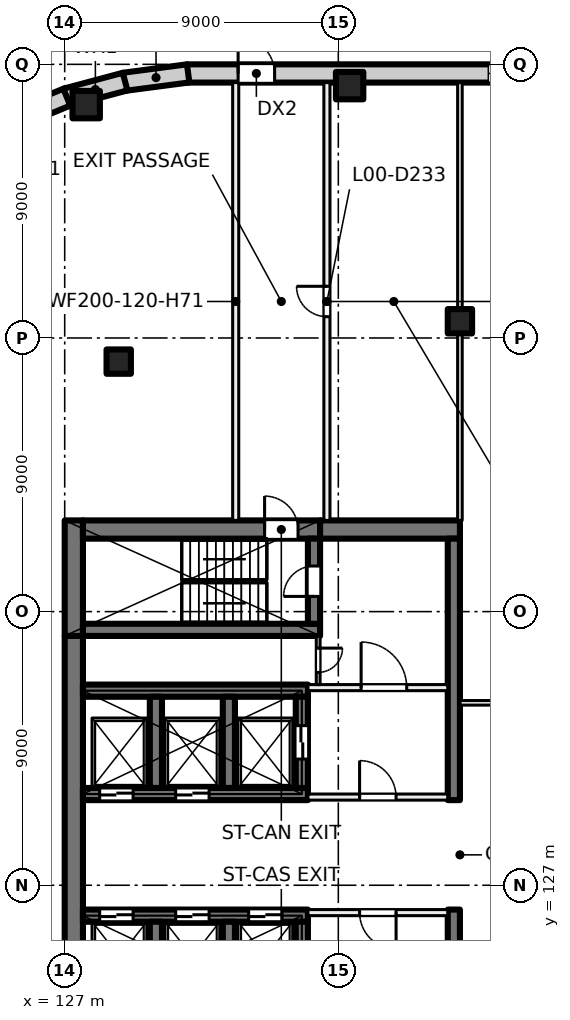
"""IFC4 building model, lengths in metres.
Left out: names, types, materials, properties, quantities, classifications, styles, units other than length and angle.
Written with IfcOpenShell. Run it as: python <this file> out.ifc"""

import sys

from ifc_helpers import new_model, si_unit, direction, frame, frame_2d, origin, origin_2d, place, context, subcontext, project, spatial, rectangle, extrude, element, fill, save


model = new_model("IFC4")
c1 = context("Model", 3, precision=1e-05, world=origin(), true_north=direction((0.0, 1.0)))
c2 = subcontext(c1, "Body", "Model", "MODEL_VIEW")
j1 = project(units=[si_unit("LENGTHUNIT", "METRE"), si_unit("PLANEANGLEUNIT", "RADIAN")], contexts=[c1])
p1 = place(None, origin())
s1 = spatial("IfcSite", under=j1, at=p1, CompositionType="ELEMENT")
p2 = place(p1, origin())
s2 = spatial("IfcBuilding", under=s1, at=p2, CompositionType="ELEMENT")
p3 = place(p2, origin())
s3 = spatial("IfcBuildingStorey", under=s2, at=p3, CompositionType="ELEMENT", Elevation=0.0)
for number, where, z_axis, x_axis in (
    (1, (127.707, 152.675, 0.0), (0.0, 0.0, 1.0), (1.0, 0.0, 0.0)),
    (2, (136.372, 153.3, 0.0), (0.0, 0.0, 1.0), (1.0, 0.0, 0.0)),
):
    element("IfcColumn", number, at=place(p3, frame(where, z_axis=z_axis, x_axis=x_axis)), inside=s3, PredefinedType="COLUMN", context=c2, shape_type="SweptSolid", body=[
        extrude(rectangle(XDim=0.9, YDim=0.9, at=origin_2d()), origin(), (0.0, 0.0, 1.0), 7.5),
    ])
for number, where, z_axis, x_axis in (
    (3, (128.777, 144.223, 0.0), (0.0, 0.0, 1.0), (1.0, 0.0, 0.0)),
    (4, (140.0, 145.55, 0.0), (0.0, 0.0, 1.0), (1.0, 0.0, 0.0)),
):
    element("IfcColumn", number, at=place(p3, frame(where, z_axis=z_axis, x_axis=x_axis)), inside=s3, PredefinedType="COLUMN", context=c2, shape_type="SweptSolid", body=[
        extrude(rectangle(XDim=0.8, YDim=0.8, at=origin_2d()), origin(), (0.0, 0.0, 1.0), 7.5),
    ])
p4 = place(p3, frame((127.3, 120.8, 0.0), z_axis=(0.0, 0.0, 1.0), x_axis=(0.0, 1.0, 0.0)))
e5 = element("IfcWall", 5, at=p4, inside=s3, PredefinedType="SHEAR", context=c2, shape_type="SweptSolid", body=[
    extrude(rectangle(XDim=14.4, YDim=0.6, at=frame_2d((7.2, 0.0))), origin(), (0.0, 0.0, 1.0), 7.5),
])
p5 = place(p3, frame((127.3, 135.2, 0.0), z_axis=(0.0, 0.0, 1.0), x_axis=(0.0, 1.0, 0.0)))
e6 = element("IfcWall", 6, at=p5, inside=s3, PredefinedType="SHEAR", context=c2, shape_type="SweptSolid", body=[
    extrude(rectangle(XDim=3.8, YDim=0.6, at=frame_2d((1.9, 0.0))), origin(), (0.0, 0.0, 1.0), 7.5),
])
p6 = place(p3, frame((127.6, 138.7, 0.0), z_axis=(0.0, 0.0, 1.0), x_axis=(1.0, 0.0, 0.0)))
e7 = element("IfcWall", 7, at=p6, inside=s3, PredefinedType="SHEAR", context=c2, shape_type="SweptSolid", body=[
    extrude(rectangle(XDim=7.8, YDim=0.6, at=frame_2d((3.9, 0.0))), origin(), (0.0, 0.0, 1.0), 7.5),
])
p7 = place(p6, frame((5.975, 0.0, 0.0)))
e8 = element("IfcOpeningElement", 8, at=p7, cuts=e7, PredefinedType="OPENING", context=c2, shape_type="SweptSolid", body=[
    extrude(rectangle(XDim=1.1, YDim=2.1, at=frame_2d((0.55, 1.05))), frame((0.0, 0.31, 0.0), z_axis=(0.0, -1.0, 0.0), x_axis=(1.0, 0.0, 0.0)), (0.0, 0.0, 1.0), 0.62),
])
p8 = place(p3, frame((135.4, 138.7, 0.0), z_axis=(0.0, 0.0, 1.0), x_axis=(1.0, 0.0, 0.0)))
e9 = element("IfcWall", 9, at=p8, inside=s3, PredefinedType="SHEAR", context=c2, shape_type="SweptSolid", body=[
    extrude(rectangle(XDim=4.6, YDim=0.6, at=frame_2d((2.3, 0.0))), origin(), (0.0, 0.0, 1.0), 7.5),
])
p9 = place(p3, frame((127.6, 135.4, 0.0), z_axis=(0.0, 0.0, 1.0), x_axis=(1.0, 0.0, 0.0)))
e10 = element("IfcWall", 10, at=p9, inside=s3, PredefinedType="SHEAR", context=c2, shape_type="SweptSolid", body=[
    extrude(rectangle(XDim=7.8, YDim=0.4, at=frame_2d((3.9, 0.0))), origin(), (0.0, 0.0, 1.0), 7.5),
])
p10 = place(p3, frame((135.2, 135.6, 0.0), z_axis=(0.0, 0.0, 1.0), x_axis=(0.0, 1.0, 0.0)))
e11 = element("IfcWall", 11, at=p10, inside=s3, PredefinedType="SHEAR", context=c2, shape_type="SweptSolid", body=[
    extrude(rectangle(XDim=2.8, YDim=0.4, at=frame_2d((1.4, 0.0))), origin(), (0.0, 0.0, 1.0), 7.5),
])
p11 = place(p10, frame((0.9, 0.0, 0.0)))
e12 = element("IfcOpeningElement", 12, at=p11, cuts=e11, PredefinedType="OPENING", context=c2, shape_type="SweptSolid", body=[
    extrude(rectangle(XDim=1.0, YDim=2.1, at=frame_2d((0.5, 1.05))), frame((0.0, 0.21, 0.0), z_axis=(0.0, -1.0, 0.0), x_axis=(1.0, 0.0, 0.0)), (0.0, 0.0, 1.0), 0.42),
])
p12 = place(p3, frame((127.6, 126.0, 0.0), z_axis=(0.0, 0.0, 1.0), x_axis=(1.0, 0.0, 0.0)))
e13 = element("IfcWall", 13, at=p12, inside=s3, PredefinedType="SHEAR", context=c2, shape_type="SweptSolid", body=[
    extrude(rectangle(XDim=7.4, YDim=0.4, at=frame_2d((3.7, 0.0))), origin(), (0.0, 0.0, 1.0), 7.5),
])
p13 = place(p12, frame((0.55, 0.0, 0.0)))
e14 = element("IfcOpeningElement", 14, at=p13, cuts=e13, PredefinedType="OPENING", context=c2, shape_type="SweptSolid", body=[
    extrude(rectangle(XDim=1.1, YDim=2.1, at=frame_2d((0.55, 1.05))), frame((0.0, 0.21, 0.0), z_axis=(0.0, -1.0, 0.0), x_axis=(1.0, 0.0, 0.0)), (0.0, 0.0, 1.0), 0.42),
])
p14 = place(p12, frame((3.05, 0.0, 0.0)))
e15 = element("IfcOpeningElement", 15, at=p14, cuts=e13, PredefinedType="OPENING", context=c2, shape_type="SweptSolid", body=[
    extrude(rectangle(XDim=1.1, YDim=2.1, at=frame_2d((0.55, 1.05))), frame((0.0, 0.21, 0.0), z_axis=(0.0, -1.0, 0.0), x_axis=(1.0, 0.0, 0.0)), (0.0, 0.0, 1.0), 0.42),
])
p15 = place(p12, frame((5.45, 0.0, 0.0)))
e16 = element("IfcOpeningElement", 16, at=p15, cuts=e13, PredefinedType="OPENING", context=c2, shape_type="SweptSolid", body=[
    extrude(rectangle(XDim=1.1, YDim=2.1, at=frame_2d((0.55, 1.05))), frame((0.0, 0.21, 0.0), z_axis=(0.0, -1.0, 0.0), x_axis=(1.0, 0.0, 0.0)), (0.0, 0.0, 1.0), 0.42),
])
for number, where, z_axis, x_axis in (
    (17, (130.0, 122.8, 0.0), (0.0, 0.0, 1.0), (0.0, 1.0, 0.0)),
    (18, (132.4, 122.8, 0.0), (0.0, 0.0, 1.0), (0.0, 1.0, 0.0)),
    (19, (134.8, 122.8, 0.0), (0.0, 0.0, 1.0), (0.0, 1.0, 0.0)),
):
    element("IfcWall", number, at=place(p3, frame(where, z_axis=z_axis, x_axis=x_axis)), inside=s3, PredefinedType="SHEAR", context=c2, shape_type="SweptSolid", body=[
        extrude(rectangle(XDim=3.0, YDim=0.4, at=frame_2d((1.5, 0.0))), origin(), (0.0, 0.0, 1.0), 7.5),
    ])
p16 = place(p3, frame((127.6, 130.0, 0.0), z_axis=(0.0, 0.0, 1.0), x_axis=(1.0, 0.0, 0.0)))
e20 = element("IfcWall", 20, at=p16, inside=s3, PredefinedType="SHEAR", context=c2, shape_type="SweptSolid", body=[
    extrude(rectangle(XDim=7.4, YDim=0.4, at=frame_2d((3.7, 0.0))), origin(), (0.0, 0.0, 1.0), 7.5),
])
p17 = place(p16, frame((0.55, 0.0, 0.0)))
e21 = element("IfcOpeningElement", 21, at=p17, cuts=e20, PredefinedType="OPENING", context=c2, shape_type="SweptSolid", body=[
    extrude(rectangle(XDim=1.1, YDim=2.1, at=frame_2d((0.55, 1.05))), frame((0.0, 0.21, 0.0), z_axis=(0.0, -1.0, 0.0), x_axis=(1.0, 0.0, 0.0)), (0.0, 0.0, 1.0), 0.42),
])
p18 = place(p16, frame((3.05, 0.0, 0.0)))
e22 = element("IfcOpeningElement", 22, at=p18, cuts=e20, PredefinedType="OPENING", context=c2, shape_type="SweptSolid", body=[
    extrude(rectangle(XDim=1.1, YDim=2.1, at=frame_2d((0.55, 1.05))), frame((0.0, 0.21, 0.0), z_axis=(0.0, -1.0, 0.0), x_axis=(1.0, 0.0, 0.0)), (0.0, 0.0, 1.0), 0.42),
])
p19 = place(p3, frame((127.6, 133.4, 0.0), z_axis=(0.0, 0.0, 1.0), x_axis=(1.0, 0.0, 0.0)))
e23 = element("IfcWall", 23, at=p19, inside=s3, PredefinedType="SHEAR", context=c2, shape_type="SweptSolid", body=[
    extrude(rectangle(XDim=7.4, YDim=0.4, at=frame_2d((3.7, 0.0))), origin(), (0.0, 0.0, 1.0), 7.5),
])
for number, where, z_axis, x_axis in (
    (24, (130.0, 130.2, 0.0), (0.0, 0.0, 1.0), (0.0, 1.0, 0.0)),
    (25, (132.4, 130.2, 0.0), (0.0, 0.0, 1.0), (0.0, 1.0, 0.0)),
):
    element("IfcWall", number, at=place(p3, frame(where, z_axis=z_axis, x_axis=x_axis)), inside=s3, PredefinedType="SHEAR", context=c2, shape_type="SweptSolid", body=[
        extrude(rectangle(XDim=3.0, YDim=0.4, at=frame_2d((1.5, 0.0))), origin(), (0.0, 0.0, 1.0), 7.5),
    ])
p20 = place(p3, frame((134.8, 130.2, 0.0), z_axis=(0.0, 0.0, 1.0), x_axis=(0.0, 1.0, 0.0)))
e26 = element("IfcWall", 26, at=p20, inside=s3, PredefinedType="SHEAR", context=c2, shape_type="SweptSolid", body=[
    extrude(rectangle(XDim=3.0, YDim=0.4, at=frame_2d((1.5, 0.0))), origin(), (0.0, 0.0, 1.0), 7.5),
])
p21 = place(p20, frame((0.95, 0.0, 0.0)))
e27 = element("IfcOpeningElement", 27, at=p21, cuts=e26, PredefinedType="OPENING", context=c2, shape_type="SweptSolid", body=[
    extrude(rectangle(XDim=1.1, YDim=2.1, at=frame_2d((0.55, 1.05))), frame((0.0, 0.21, 0.0), z_axis=(0.0, -1.0, 0.0), x_axis=(1.0, 0.0, 0.0)), (0.0, 0.0, 1.0), 0.42),
])
for number, where, z_axis, x_axis in (
    (28, (139.8, 117.6, 0.0), (0.0, 0.0, 1.0), (0.0, 1.0, 0.0)),
    (29, (139.8, 129.8, 0.0), (0.0, 0.0, 1.0), (0.0, 1.0, 0.0)),
):
    element("IfcWall", number, at=place(p3, frame(where, z_axis=z_axis, x_axis=x_axis)), inside=s3, PredefinedType="SHEAR", context=c2, shape_type="SweptSolid", body=[
        extrude(rectangle(XDim=8.6, YDim=0.4, at=frame_2d((4.3, 0.0))), origin(), (0.0, 0.0, 1.0), 7.5),
    ])
p22 = place(p3, frame((131.022, 153.7, 0.0), z_axis=(0.0, 0.0, 1.0), x_axis=(1.0, 0.0, 0.0)))
e30 = element("IfcWall", 30, at=p22, inside=s3, PredefinedType="SOLIDWALL", context=c2, shape_type="SweptSolid", body=[
    extrude(rectangle(XDim=31.957, YDim=0.6, at=frame_2d((15.978, 0.0))), origin(), (0.0, 0.0, 1.0), 7.1),
])
p23 = place(p22, frame((1.683, 0.0, 0.0)))
e31 = element("IfcOpeningElement", 31, at=p23, cuts=e30, PredefinedType="OPENING", context=c2, shape_type="SweptSolid", body=[
    extrude(rectangle(XDim=1.2, YDim=2.4, at=frame_2d((0.6, 1.2))), frame((0.0, 0.31, 0.0), z_axis=(0.0, -1.0, 0.0), x_axis=(1.0, 0.0, 0.0)), (0.0, 0.0, 1.0), 0.62),
])
p24 = place(p22, frame((9.913, 0.0, 0.9)))
e32 = element("IfcOpeningElement", 32, at=p24, cuts=e30, PredefinedType="OPENING", context=c2, shape_type="SweptSolid", body=[
    extrude(rectangle(XDim=3.0, YDim=4.2, at=frame_2d((1.5, 2.1))), frame((0.0, 0.31, 0.0), z_axis=(0.0, -1.0, 0.0), x_axis=(1.0, 0.0, 0.0)), (0.0, 0.0, 1.0), 0.62),
])
p25 = place(p22, frame((14.928, 0.0, 0.9)))
e33 = element("IfcOpeningElement", 33, at=p25, cuts=e30, PredefinedType="OPENING", context=c2, shape_type="SweptSolid", body=[
    extrude(rectangle(XDim=3.0, YDim=4.2, at=frame_2d((1.5, 2.1))), frame((0.0, 0.31, 0.0), z_axis=(0.0, -1.0, 0.0), x_axis=(1.0, 0.0, 0.0)), (0.0, 0.0, 1.0), 0.62),
])
p26 = place(p22, frame((19.043, 0.0, 0.9)))
e34 = element("IfcOpeningElement", 34, at=p26, cuts=e30, PredefinedType="OPENING", context=c2, shape_type="SweptSolid", body=[
    extrude(rectangle(XDim=3.0, YDim=4.2, at=frame_2d((1.5, 2.1))), frame((0.0, 0.31, 0.0), z_axis=(0.0, -1.0, 0.0), x_axis=(1.0, 0.0, 0.0)), (0.0, 0.0, 1.0), 0.62),
])
p27 = place(p22, frame((23.609, 0.0, 0.9)))
e35 = element("IfcOpeningElement", 35, at=p27, cuts=e30, PredefinedType="OPENING", context=c2, shape_type="SweptSolid", body=[
    extrude(rectangle(XDim=3.0, YDim=4.2, at=frame_2d((1.5, 2.1))), frame((0.0, 0.31, 0.0), z_axis=(0.0, -1.0, 0.0), x_axis=(1.0, 0.0, 0.0)), (0.0, 0.0, 1.0), 0.62),
])
p28 = place(p22, frame((29.074, 0.0, 0.0)))
e36 = element("IfcOpeningElement", 36, at=p28, cuts=e30, PredefinedType="OPENING", context=c2, shape_type="SweptSolid", body=[
    extrude(rectangle(XDim=1.2, YDim=2.4, at=frame_2d((0.6, 1.2))), frame((0.0, 0.31, 0.0), z_axis=(0.0, -1.0, 0.0), x_axis=(1.0, 0.0, 0.0)), (0.0, 0.0, 1.0), 0.62),
])
p29 = place(p3, frame((128.948, 153.424, 0.0), z_axis=(0.0, 0.0, 1.0), x_axis=(0.991440646942, 0.130558200013, 0.0)))
e37 = element("IfcWall", 37, at=p29, inside=s3, PredefinedType="SOLIDWALL", context=c2, shape_type="SweptSolid", body=[
    extrude(rectangle(XDim=2.132, YDim=0.6, at=frame_2d((1.066, 0.0))), origin(), (0.0, 0.0, 1.0), 7.1),
])
p30 = place(p3, frame((127.032, 152.908, 0.0), z_axis=(0.0, 0.0, 1.0), x_axis=(0.965929732323, 0.258804467146, 0.0)))
e38 = element("IfcWall", 38, at=p30, inside=s3, PredefinedType="SOLIDWALL", context=c2, shape_type="SweptSolid", body=[
    extrude(rectangle(XDim=2.022, YDim=0.6, at=frame_2d((1.011, 0.0))), origin(), (0.0, 0.0, 1.0), 7.1),
])
p31 = place(p3, frame((125.181, 152.14, 0.0), z_axis=(0.0, 0.0, 1.0), x_axis=(0.924021197839, 0.382341242798, 0.0)))
e39 = element("IfcWall", 39, at=p31, inside=s3, PredefinedType="SOLIDWALL", context=c2, shape_type="SweptSolid", body=[
    extrude(rectangle(XDim=2.044, YDim=0.6, at=frame_2d((1.022, 0.0))), origin(), (0.0, 0.0, 1.0), 7.1),
])
p32 = place(p3, frame((135.0, 129.9, 0.0), z_axis=(0.0, 0.0, 1.0), x_axis=(1.0, 0.0, 0.0)))
e40 = element("IfcWall", 40, at=p32, inside=s3, PredefinedType="PARTITIONING", context=c2, shape_type="SweptSolid", body=[
    extrude(rectangle(XDim=4.6, YDim=0.2, at=frame_2d((2.3, 0.0))), origin(), (0.0, 0.0, 1.0), 7.1),
])
p33 = place(p32, frame((1.7, 0.0, 0.0)))
e41 = element("IfcOpeningElement", 41, at=p33, cuts=e40, PredefinedType="OPENING", context=c2, shape_type="SweptSolid", body=[
    extrude(rectangle(XDim=1.2, YDim=2.1, at=frame_2d((0.6, 1.05))), frame((0.0, 0.11, 0.0), z_axis=(0.0, -1.0, 0.0), x_axis=(1.0, 0.0, 0.0)), (0.0, 0.0, 1.0), 0.22),
])
p34 = place(p3, frame((135.0, 133.5, 0.0), z_axis=(0.0, 0.0, 1.0), x_axis=(1.0, 0.0, 0.0)))
e42 = element("IfcWall", 42, at=p34, inside=s3, PredefinedType="PARTITIONING", context=c2, shape_type="SweptSolid", body=[
    extrude(rectangle(XDim=4.6, YDim=0.2, at=frame_2d((2.3, 0.0))), origin(), (0.0, 0.0, 1.0), 7.1),
])
p35 = place(p34, frame((1.75, 0.0, 0.0)))
e43 = element("IfcOpeningElement", 43, at=p35, cuts=e42, PredefinedType="OPENING", context=c2, shape_type="SweptSolid", body=[
    extrude(rectangle(XDim=1.5, YDim=2.1, at=frame_2d((0.75, 1.05))), frame((0.0, 0.11, 0.0), z_axis=(0.0, -1.0, 0.0), x_axis=(1.0, 0.0, 0.0)), (0.0, 0.0, 1.0), 0.22),
])
p36 = place(p3, frame((135.337, 135.2, 0.0), z_axis=(0.0, 0.0, 1.0), x_axis=(0.0, -1.0, 0.0)))
e44 = element("IfcWall", 44, at=p36, inside=s3, PredefinedType="PARTITIONING", context=c2, shape_type="SweptSolid", body=[
    extrude(rectangle(XDim=1.6, YDim=0.125, at=frame_2d((0.8, 0.0))), origin(), (0.0, 0.0, 1.0), 7.1),
])
p37 = place(p36, frame((0.4, 0.0, 0.0)))
e45 = element("IfcOpeningElement", 45, at=p37, cuts=e44, PredefinedType="OPENING", context=c2, shape_type="SweptSolid", body=[
    extrude(rectangle(XDim=0.8, YDim=2.1, at=frame_2d((0.4, 1.05))), frame((0.0, 0.073, 0.0), z_axis=(0.0, -1.0, 0.0), x_axis=(1.0, 0.0, 0.0)), (0.0, 0.0, 1.0), 0.145),
])
p38 = place(p3, frame((139.6, 126.1, 0.0), z_axis=(0.0, 0.0, 1.0), x_axis=(-1.0, 0.0, 0.0)))
e46 = element("IfcWall", 46, at=p38, inside=s3, PredefinedType="PARTITIONING", context=c2, shape_type="SweptSolid", body=[
    extrude(rectangle(XDim=4.6, YDim=0.2, at=frame_2d((2.3, 0.0))), origin(), (0.0, 0.0, 1.0), 7.1),
])
p39 = place(p38, frame((1.7, 0.0, 0.0)))
e47 = element("IfcOpeningElement", 47, at=p39, cuts=e46, PredefinedType="OPENING", context=c2, shape_type="SweptSolid", body=[
    extrude(rectangle(XDim=1.2, YDim=2.1, at=frame_2d((0.6, 1.05))), frame((0.0, 0.11, 0.0), z_axis=(0.0, -1.0, 0.0), x_axis=(1.0, 0.0, 0.0)), (0.0, 0.0, 1.0), 0.22),
])
p40 = place(p3, frame((132.625, 139.0, 0.0), z_axis=(0.0, 0.0, 1.0), x_axis=(0.0, 1.0, 0.0)))
e48 = element("IfcWall", 48, at=p40, inside=s3, PredefinedType="PARTITIONING", context=c2, shape_type="SweptSolid", body=[
    extrude(rectangle(XDim=14.4, YDim=0.2, at=frame_2d((7.2, 0.0))), origin(), (0.0, 0.0, 1.0), 7.1),
])
p41 = place(p3, frame((135.625, 153.4, 0.0), z_axis=(0.0, 0.0, 1.0), x_axis=(0.0, -1.0, 0.0)))
e49 = element("IfcWall", 49, at=p41, inside=s3, PredefinedType="PARTITIONING", context=c2, shape_type="SweptSolid", body=[
    extrude(rectangle(XDim=14.4, YDim=0.2, at=frame_2d((7.2, 0.0))), origin(), (0.0, 0.0, 1.0), 7.1),
])
p42 = place(p41, frame((6.7, 0.0, 0.0)))
e50 = element("IfcOpeningElement", 50, at=p42, cuts=e49, PredefinedType="OPENING", context=c2, shape_type="SweptSolid", body=[
    extrude(rectangle(XDim=1.0, YDim=2.1, at=frame_2d((0.5, 1.05))), frame((0.0, 0.11, 0.0), z_axis=(0.0, -1.0, 0.0), x_axis=(1.0, 0.0, 0.0)), (0.0, 0.0, 1.0), 0.22),
])
p43 = place(p3, frame((140.0, 133.0, 0.0), z_axis=(0.0, 0.0, 1.0), x_axis=(1.0, 0.0, 0.0)))
e51 = element("IfcWall", 51, at=p43, inside=s3, PredefinedType="PARTITIONING", context=c2, shape_type="SweptSolid", body=[
    extrude(rectangle(XDim=14.0, YDim=0.15, at=frame_2d((7.0, 0.0))), origin(), (0.0, 0.0, 1.0), 7.1),
])
p44 = place(p43, frame((6.1, 0.0, 0.0)))
e52 = element("IfcOpeningElement", 52, at=p44, cuts=e51, PredefinedType="OPENING", context=c2, shape_type="SweptSolid", body=[
    extrude(rectangle(XDim=1.8, YDim=2.1, at=frame_2d((0.9, 1.05))), frame((0.0, 0.085, 0.0), z_axis=(0.0, -1.0, 0.0), x_axis=(1.0, 0.0, 0.0)), (0.0, 0.0, 1.0), 0.17),
])
p45 = place(p3, frame((140.0, 139.0, 0.0), z_axis=(0.0, 0.0, 1.0), x_axis=(0.0, 1.0, 0.0)))
e53 = element("IfcWall", 53, at=p45, inside=s3, PredefinedType="PARTITIONING", context=c2, shape_type="SweptSolid", body=[
    extrude(rectangle(XDim=14.4, YDim=0.15, at=frame_2d((7.2, 0.0))), origin(), (0.0, 0.0, 1.0), 7.1),
])
p46 = place(p23, origin())
e54 = element("IfcDoor", 54, at=p46, inside=s3, OperationType="SINGLE_SWING_LEFT", PredefinedType="DOOR", context=c2, shape_type="SweptSolid", body=[
    extrude(rectangle(XDim=1.2, YDim=2.4, at=frame_2d((0.6, 1.2))), frame((0.0, 0.025, 0.0), z_axis=(0.0, -1.0, 0.0), x_axis=(1.0, 0.0, 0.0)), (0.0, 0.0, 1.0), 0.05),
])
fill(e31, e54)
p47 = place(p24, origin())
e55 = element("IfcWindow", 55, at=p47, inside=s3, PartitioningType="SINGLE_PANEL", PredefinedType="WINDOW", context=c2, shape_type="SweptSolid", body=[
    extrude(rectangle(XDim=3.0, YDim=4.2, at=frame_2d((1.5, 2.1))), frame((0.0, 0.03, 0.0), z_axis=(0.0, -1.0, 0.0), x_axis=(1.0, 0.0, 0.0)), (0.0, 0.0, 1.0), 0.06),
])
fill(e32, e55)
p48 = place(p17, origin())
e56 = element("IfcDoor", 56, at=p48, inside=s3, OperationType="DOUBLE_DOOR_SLIDING", PredefinedType="DOOR", context=c2, shape_type="SweptSolid", body=[
    extrude(rectangle(XDim=1.1, YDim=2.1, at=frame_2d((0.55, 1.05))), frame((0.0, 0.025, 0.0), z_axis=(0.0, -1.0, 0.0), x_axis=(1.0, 0.0, 0.0)), (0.0, 0.0, 1.0), 0.05),
])
fill(e21, e56)
p49 = place(p18, origin())
e57 = element("IfcDoor", 57, at=p49, inside=s3, OperationType="DOUBLE_DOOR_SLIDING", PredefinedType="DOOR", context=c2, shape_type="SweptSolid", body=[
    extrude(rectangle(XDim=1.1, YDim=2.1, at=frame_2d((0.55, 1.05))), frame((0.0, 0.025, 0.0), z_axis=(0.0, -1.0, 0.0), x_axis=(1.0, 0.0, 0.0)), (0.0, 0.0, 1.0), 0.05),
])
fill(e22, e57)
p50 = place(p13, origin())
e58 = element("IfcDoor", 58, at=p50, inside=s3, OperationType="DOUBLE_DOOR_SLIDING", PredefinedType="DOOR", context=c2, shape_type="SweptSolid", body=[
    extrude(rectangle(XDim=1.1, YDim=2.1, at=frame_2d((0.55, 1.05))), frame((0.0, 0.025, 0.0), z_axis=(0.0, -1.0, 0.0), x_axis=(1.0, 0.0, 0.0)), (0.0, 0.0, 1.0), 0.05),
])
fill(e14, e58)
p51 = place(p14, origin())
e59 = element("IfcDoor", 59, at=p51, inside=s3, OperationType="DOUBLE_DOOR_SLIDING", PredefinedType="DOOR", context=c2, shape_type="SweptSolid", body=[
    extrude(rectangle(XDim=1.1, YDim=2.1, at=frame_2d((0.55, 1.05))), frame((0.0, 0.025, 0.0), z_axis=(0.0, -1.0, 0.0), x_axis=(1.0, 0.0, 0.0)), (0.0, 0.0, 1.0), 0.05),
])
fill(e15, e59)
p52 = place(p15, origin())
e60 = element("IfcDoor", 60, at=p52, inside=s3, OperationType="DOUBLE_DOOR_SLIDING", PredefinedType="DOOR", context=c2, shape_type="SweptSolid", body=[
    extrude(rectangle(XDim=1.1, YDim=2.1, at=frame_2d((0.55, 1.05))), frame((0.0, 0.025, 0.0), z_axis=(0.0, -1.0, 0.0), x_axis=(1.0, 0.0, 0.0)), (0.0, 0.0, 1.0), 0.05),
])
fill(e16, e60)
p53 = place(p33, origin())
e61 = element("IfcDoor", 61, at=p53, inside=s3, OperationType="DOUBLE_DOOR_SINGLE_SWING", PredefinedType="DOOR", context=c2, shape_type="SweptSolid", body=[
    extrude(rectangle(XDim=1.2, YDim=2.1, at=frame_2d((0.6, 1.05))), frame((0.0, 0.025, 0.0), z_axis=(0.0, -1.0, 0.0), x_axis=(1.0, 0.0, 0.0)), (0.0, 0.0, 1.0), 0.05),
])
fill(e41, e61)
p54 = place(p35, origin())
e62 = element("IfcDoor", 62, at=p54, inside=s3, OperationType="DOUBLE_DOOR_SINGLE_SWING", PredefinedType="DOOR", context=c2, shape_type="SweptSolid", body=[
    extrude(rectangle(XDim=1.5, YDim=2.1, at=frame_2d((0.75, 1.05))), frame((0.0, 0.025, 0.0), z_axis=(0.0, -1.0, 0.0), x_axis=(1.0, 0.0, 0.0)), (0.0, 0.0, 1.0), 0.05),
])
fill(e43, e62)
p55 = place(p11, origin())
e63 = element("IfcDoor", 63, at=p55, inside=s3, OperationType="SINGLE_SWING_LEFT", PredefinedType="DOOR", context=c2, shape_type="SweptSolid", body=[
    extrude(rectangle(XDim=1.0, YDim=2.1, at=frame_2d((0.5, 1.05))), frame((0.0, 0.025, 0.0), z_axis=(0.0, -1.0, 0.0), x_axis=(1.0, 0.0, 0.0)), (0.0, 0.0, 1.0), 0.05),
])
fill(e12, e63)
p56 = place(p37, origin())
e64 = element("IfcDoor", 64, at=p56, inside=s3, OperationType="SINGLE_SWING_RIGHT", PredefinedType="DOOR", context=c2, shape_type="SweptSolid", body=[
    extrude(rectangle(XDim=0.8, YDim=2.1, at=frame_2d((0.4, 1.05))), frame((0.0, 0.025, 0.0), z_axis=(0.0, -1.0, 0.0), x_axis=(1.0, 0.0, 0.0)), (0.0, 0.0, 1.0), 0.05),
])
fill(e45, e64)
p57 = place(p39, origin())
e65 = element("IfcDoor", 65, at=p57, inside=s3, OperationType="DOUBLE_DOOR_SINGLE_SWING", PredefinedType="DOOR", context=c2, shape_type="SweptSolid", body=[
    extrude(rectangle(XDim=1.2, YDim=2.1, at=frame_2d((0.6, 1.05))), frame((0.0, 0.025, 0.0), z_axis=(0.0, -1.0, 0.0), x_axis=(1.0, 0.0, 0.0)), (0.0, 0.0, 1.0), 0.05),
])
fill(e47, e65)
p58 = place(p21, origin())
e66 = element("IfcDoor", 66, at=p58, inside=s3, OperationType="DOUBLE_DOOR_SLIDING", PredefinedType="DOOR", context=c2, shape_type="SweptSolid", body=[
    extrude(rectangle(XDim=1.1, YDim=2.1, at=frame_2d((0.55, 1.05))), frame((0.0, 0.025, 0.0), z_axis=(0.0, -1.0, 0.0), x_axis=(1.0, 0.0, 0.0)), (0.0, 0.0, 1.0), 0.05),
])
fill(e27, e66)
p59 = place(p7, origin())
e67 = element("IfcDoor", 67, at=p59, inside=s3, OperationType="SINGLE_SWING_LEFT", PredefinedType="DOOR", context=c2, shape_type="SweptSolid", body=[
    extrude(rectangle(XDim=1.1, YDim=2.1, at=frame_2d((0.55, 1.05))), frame((0.0, 0.025, 0.0), z_axis=(0.0, -1.0, 0.0), x_axis=(1.0, 0.0, 0.0)), (0.0, 0.0, 1.0), 0.05),
])
fill(e8, e67)
p60 = place(p42, origin())
e68 = element("IfcDoor", 68, at=p60, inside=s3, OperationType="SINGLE_SWING_LEFT", PredefinedType="DOOR", context=c2, shape_type="SweptSolid", body=[
    extrude(rectangle(XDim=1.0, YDim=2.1, at=frame_2d((0.5, 1.05))), frame((0.0, 0.025, 0.0), z_axis=(0.0, -1.0, 0.0), x_axis=(1.0, 0.0, 0.0)), (0.0, 0.0, 1.0), 0.05),
])
fill(e50, e68)
save(model, sys.argv[1])
